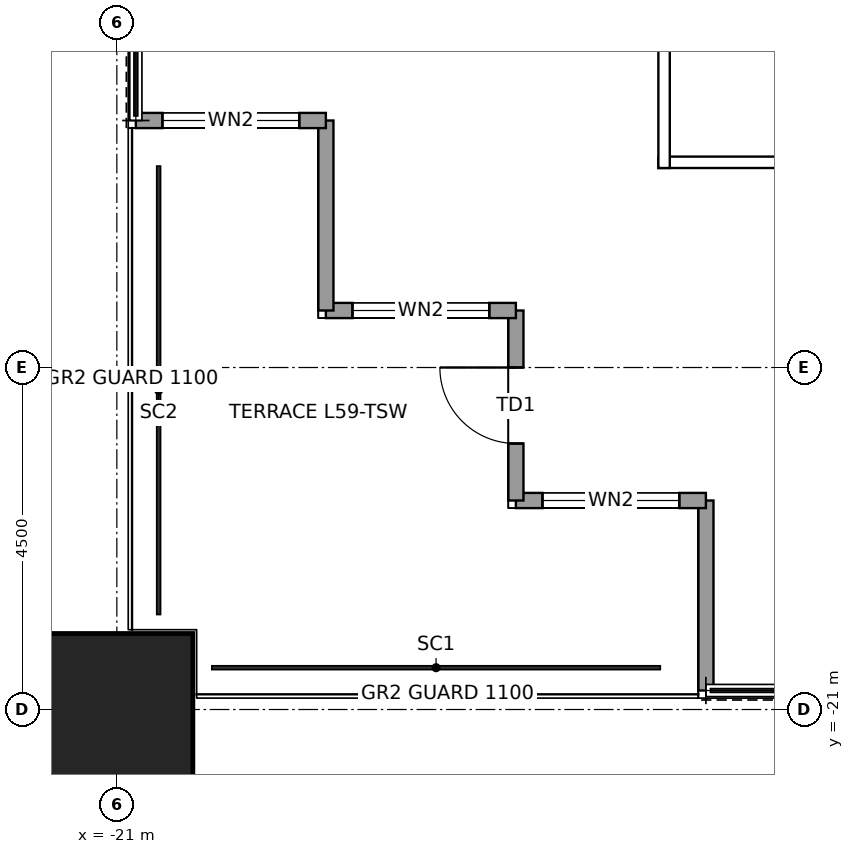
"""IFC4 building model, lengths in metres.
Left out: names, types, materials, properties, quantities, classifications, styles, units other than length and angle.
Written with IfcOpenShell. Run it as: python <this file> out.ifc"""

import sys

from ifc_helpers import new_model, si_unit, direction, frame, frame_2d, origin, origin_2d, place, context, subcontext, project, spatial, rectangle, hollow_rectangle, extrude, element, fill, save


model = new_model("IFC4")
c1 = context("Model", 3, precision=1e-05, world=origin(), true_north=direction((0.0, 1.0)))
c2 = subcontext(c1, "Body", "Model", "MODEL_VIEW")
j1 = project(units=[si_unit("LENGTHUNIT", "METRE"), si_unit("PLANEANGLEUNIT", "RADIAN")], contexts=[c1])
p1 = place(None, origin())
s1 = spatial("IfcSite", under=j1, at=p1, CompositionType="ELEMENT")
p2 = place(p1, origin())
s2 = spatial("IfcBuilding", under=s1, at=p2, CompositionType="ELEMENT")
p3 = place(p2, frame((0.0, 0.0, 271.9)))
s3 = spatial("IfcBuildingStorey", under=s2, at=p3, CompositionType="ELEMENT", Elevation=271.9)
p4 = place(p3, frame((-21.0, -21.0, 0.0), z_axis=(0.0, 0.0, 1.0), x_axis=(1.0, 0.0, 0.0)))
e1 = element("IfcColumn", 1, at=p4, inside=s3, PredefinedType="COLUMN", context=c2, shape_type="SweptSolid", body=[
    extrude(hollow_rectangle(XDim=2.0, YDim=2.0, WallThickness=0.095, at=origin_2d()), origin(), (0.0, 0.0, 1.0), 4.0),
])
p5 = place(p3, frame((-13.25, -20.75, 0.0), z_axis=(0.0, 0.0, 1.0), x_axis=(0.0, 1.0, 0.0)))
e2 = element("IfcWall", 2, at=p5, inside=s3, PredefinedType="SOLIDWALL", context=c2, shape_type="SweptSolid", body=[
    extrude(rectangle(XDim=2.5, YDim=0.2, at=frame_2d((1.25, 0.0))), origin(), (0.0, 0.0, 1.0), 3.85),
])
p6 = place(p3, frame((-13.25, -18.25, 0.0), z_axis=(0.0, 0.0, 1.0), x_axis=(-1.0, 0.0, 0.0)))
e3 = element("IfcWall", 3, at=p6, inside=s3, PredefinedType="SOLIDWALL", context=c2, shape_type="SweptSolid", body=[
    extrude(rectangle(XDim=2.5, YDim=0.2, at=frame_2d((1.25, 0.0))), origin(), (0.0, 0.0, 1.0), 3.85),
])
p7 = place(p6, frame((0.35, 0.0, 0.3)))
e4 = element("IfcOpeningElement", 4, at=p7, cuts=e3, PredefinedType="OPENING", context=c2, shape_type="SweptSolid", body=[
    extrude(rectangle(XDim=1.8, YDim=2.4, at=frame_2d((0.9, 1.2))), frame((0.0, 0.11, 0.0), z_axis=(0.0, -1.0, 0.0), x_axis=(1.0, 0.0, 0.0)), (0.0, 0.0, 1.0), 0.22),
])
p8 = place(p3, frame((-15.75, -18.25, 0.0), z_axis=(0.0, 0.0, 1.0), x_axis=(0.0, 1.0, 0.0)))
e5 = element("IfcWall", 5, at=p8, inside=s3, PredefinedType="SOLIDWALL", context=c2, shape_type="SweptSolid", body=[
    extrude(rectangle(XDim=2.5, YDim=0.2, at=frame_2d((1.25, 0.0))), origin(), (0.0, 0.0, 1.0), 3.317),
])
p9 = place(p8, frame((0.75, 0.0, 0.0)))
e6 = element("IfcOpeningElement", 6, at=p9, cuts=e5, PredefinedType="OPENING", context=c2, shape_type="SweptSolid", body=[
    extrude(rectangle(XDim=1.0, YDim=2.4, at=frame_2d((0.5, 1.2))), frame((0.0, 0.11, 0.0), z_axis=(0.0, -1.0, 0.0), x_axis=(1.0, 0.0, 0.0)), (0.0, 0.0, 1.0), 0.22),
])
p10 = place(p3, frame((-15.75, -15.75, 0.0), z_axis=(0.0, 0.0, 1.0), x_axis=(-1.0, 0.0, 0.0)))
e7 = element("IfcWall", 7, at=p10, inside=s3, PredefinedType="SOLIDWALL", context=c2, shape_type="SweptSolid", body=[
    extrude(rectangle(XDim=2.5, YDim=0.2, at=frame_2d((1.25, 0.0))), origin(), (0.0, 0.0, 1.0), 3.85),
])
p11 = place(p10, frame((0.35, 0.0, 0.3)))
e8 = element("IfcOpeningElement", 8, at=p11, cuts=e7, PredefinedType="OPENING", context=c2, shape_type="SweptSolid", body=[
    extrude(rectangle(XDim=1.8, YDim=2.4, at=frame_2d((0.9, 1.2))), frame((0.0, 0.11, 0.0), z_axis=(0.0, -1.0, 0.0), x_axis=(1.0, 0.0, 0.0)), (0.0, 0.0, 1.0), 0.22),
])
p12 = place(p3, frame((-18.25, -15.75, 0.0), z_axis=(0.0, 0.0, 1.0), x_axis=(0.0, 1.0, 0.0)))
e9 = element("IfcWall", 9, at=p12, inside=s3, PredefinedType="SOLIDWALL", context=c2, shape_type="SweptSolid", body=[
    extrude(rectangle(XDim=2.5, YDim=0.2, at=frame_2d((1.25, 0.0))), origin(), (0.0, 0.0, 1.0), 3.85),
])
p13 = place(p3, frame((-18.25, -13.25, 0.0), z_axis=(0.0, 0.0, 1.0), x_axis=(-1.0, 0.0, 0.0)))
e10 = element("IfcWall", 10, at=p13, inside=s3, PredefinedType="SOLIDWALL", context=c2, shape_type="SweptSolid", body=[
    extrude(rectangle(XDim=2.5, YDim=0.2, at=frame_2d((1.25, 0.0))), origin(), (0.0, 0.0, 1.0), 3.85),
])
p14 = place(p13, frame((0.35, 0.0, 0.3)))
e11 = element("IfcOpeningElement", 11, at=p14, cuts=e10, PredefinedType="OPENING", context=c2, shape_type="SweptSolid", body=[
    extrude(rectangle(XDim=1.8, YDim=2.4, at=frame_2d((0.9, 1.2))), frame((0.0, 0.11, 0.0), z_axis=(0.0, -1.0, 0.0), x_axis=(1.0, 0.0, 0.0)), (0.0, 0.0, 1.0), 0.22),
])
p15 = place(p3, frame((-13.875, -13.8, 0.0), z_axis=(0.0, 0.0, 1.0), x_axis=(1.0, 0.0, 0.0)))
e12 = element("IfcWall", 12, at=p15, inside=s3, PredefinedType="PARTITIONING", context=c2, shape_type="SweptSolid", body=[
    extrude(rectangle(XDim=27.75, YDim=0.15, at=frame_2d((13.875, 0.0))), origin(), (0.0, 0.0, 1.0), 3.85),
])
p16 = place(p15, frame((3.975, 0.0, 0.0)))
e13 = element("IfcOpeningElement", 13, at=p16, cuts=e12, PredefinedType="OPENING", context=c2, shape_type="SweptSolid", body=[
    extrude(rectangle(XDim=1.0, YDim=2.4, at=frame_2d((0.5, 1.2))), frame((0.0, 0.085, 0.0), z_axis=(0.0, -1.0, 0.0), x_axis=(1.0, 0.0, 0.0)), (0.0, 0.0, 1.0), 0.17),
])
p17 = place(p3, frame((-13.8, -13.875, 0.0), z_axis=(0.0, 0.0, 1.0), x_axis=(0.0, 1.0, 0.0)))
e14 = element("IfcWall", 14, at=p17, inside=s3, PredefinedType="PARTITIONING", context=c2, shape_type="SweptSolid", body=[
    extrude(rectangle(XDim=27.75, YDim=0.15, at=frame_2d((13.875, 0.0))), origin(), (0.0, 0.0, 1.0), 3.85),
])
p18 = place(p7, origin())
e15 = element("IfcWindow", 15, at=p18, inside=s3, PartitioningType="SINGLE_PANEL", PredefinedType="WINDOW", context=c2, shape_type="SweptSolid", body=[
    extrude(rectangle(XDim=1.8, YDim=2.4, at=frame_2d((0.9, 1.2))), frame((0.0, 0.03, 0.0), z_axis=(0.0, -1.0, 0.0), x_axis=(1.0, 0.0, 0.0)), (0.0, 0.0, 1.0), 0.06),
])
fill(e4, e15)
p19 = place(p9, origin())
e16 = element("IfcDoor", 16, at=p19, inside=s3, OperationType="SINGLE_SWING_RIGHT", PredefinedType="DOOR", context=c2, shape_type="SweptSolid", body=[
    extrude(rectangle(XDim=1.0, YDim=2.4, at=frame_2d((0.5, 1.2))), frame((0.0, 0.025, 0.0), z_axis=(0.0, -1.0, 0.0), x_axis=(1.0, 0.0, 0.0)), (0.0, 0.0, 1.0), 0.05),
])
fill(e6, e16)
p20 = place(p11, origin())
e17 = element("IfcWindow", 17, at=p20, inside=s3, PartitioningType="SINGLE_PANEL", PredefinedType="WINDOW", context=c2, shape_type="SweptSolid", body=[
    extrude(rectangle(XDim=1.8, YDim=2.4, at=frame_2d((0.9, 1.2))), frame((0.0, 0.03, 0.0), z_axis=(0.0, -1.0, 0.0), x_axis=(1.0, 0.0, 0.0)), (0.0, 0.0, 1.0), 0.06),
])
fill(e8, e17)
p21 = place(p14, origin())
e18 = element("IfcWindow", 18, at=p21, inside=s3, PartitioningType="SINGLE_PANEL", PredefinedType="WINDOW", context=c2, shape_type="SweptSolid", body=[
    extrude(rectangle(XDim=1.8, YDim=2.4, at=frame_2d((0.9, 1.2))), frame((0.0, 0.03, 0.0), z_axis=(0.0, -1.0, 0.0), x_axis=(1.0, 0.0, 0.0)), (0.0, 0.0, 1.0), 0.06),
])
fill(e11, e18)
save(model, sys.argv[1])
